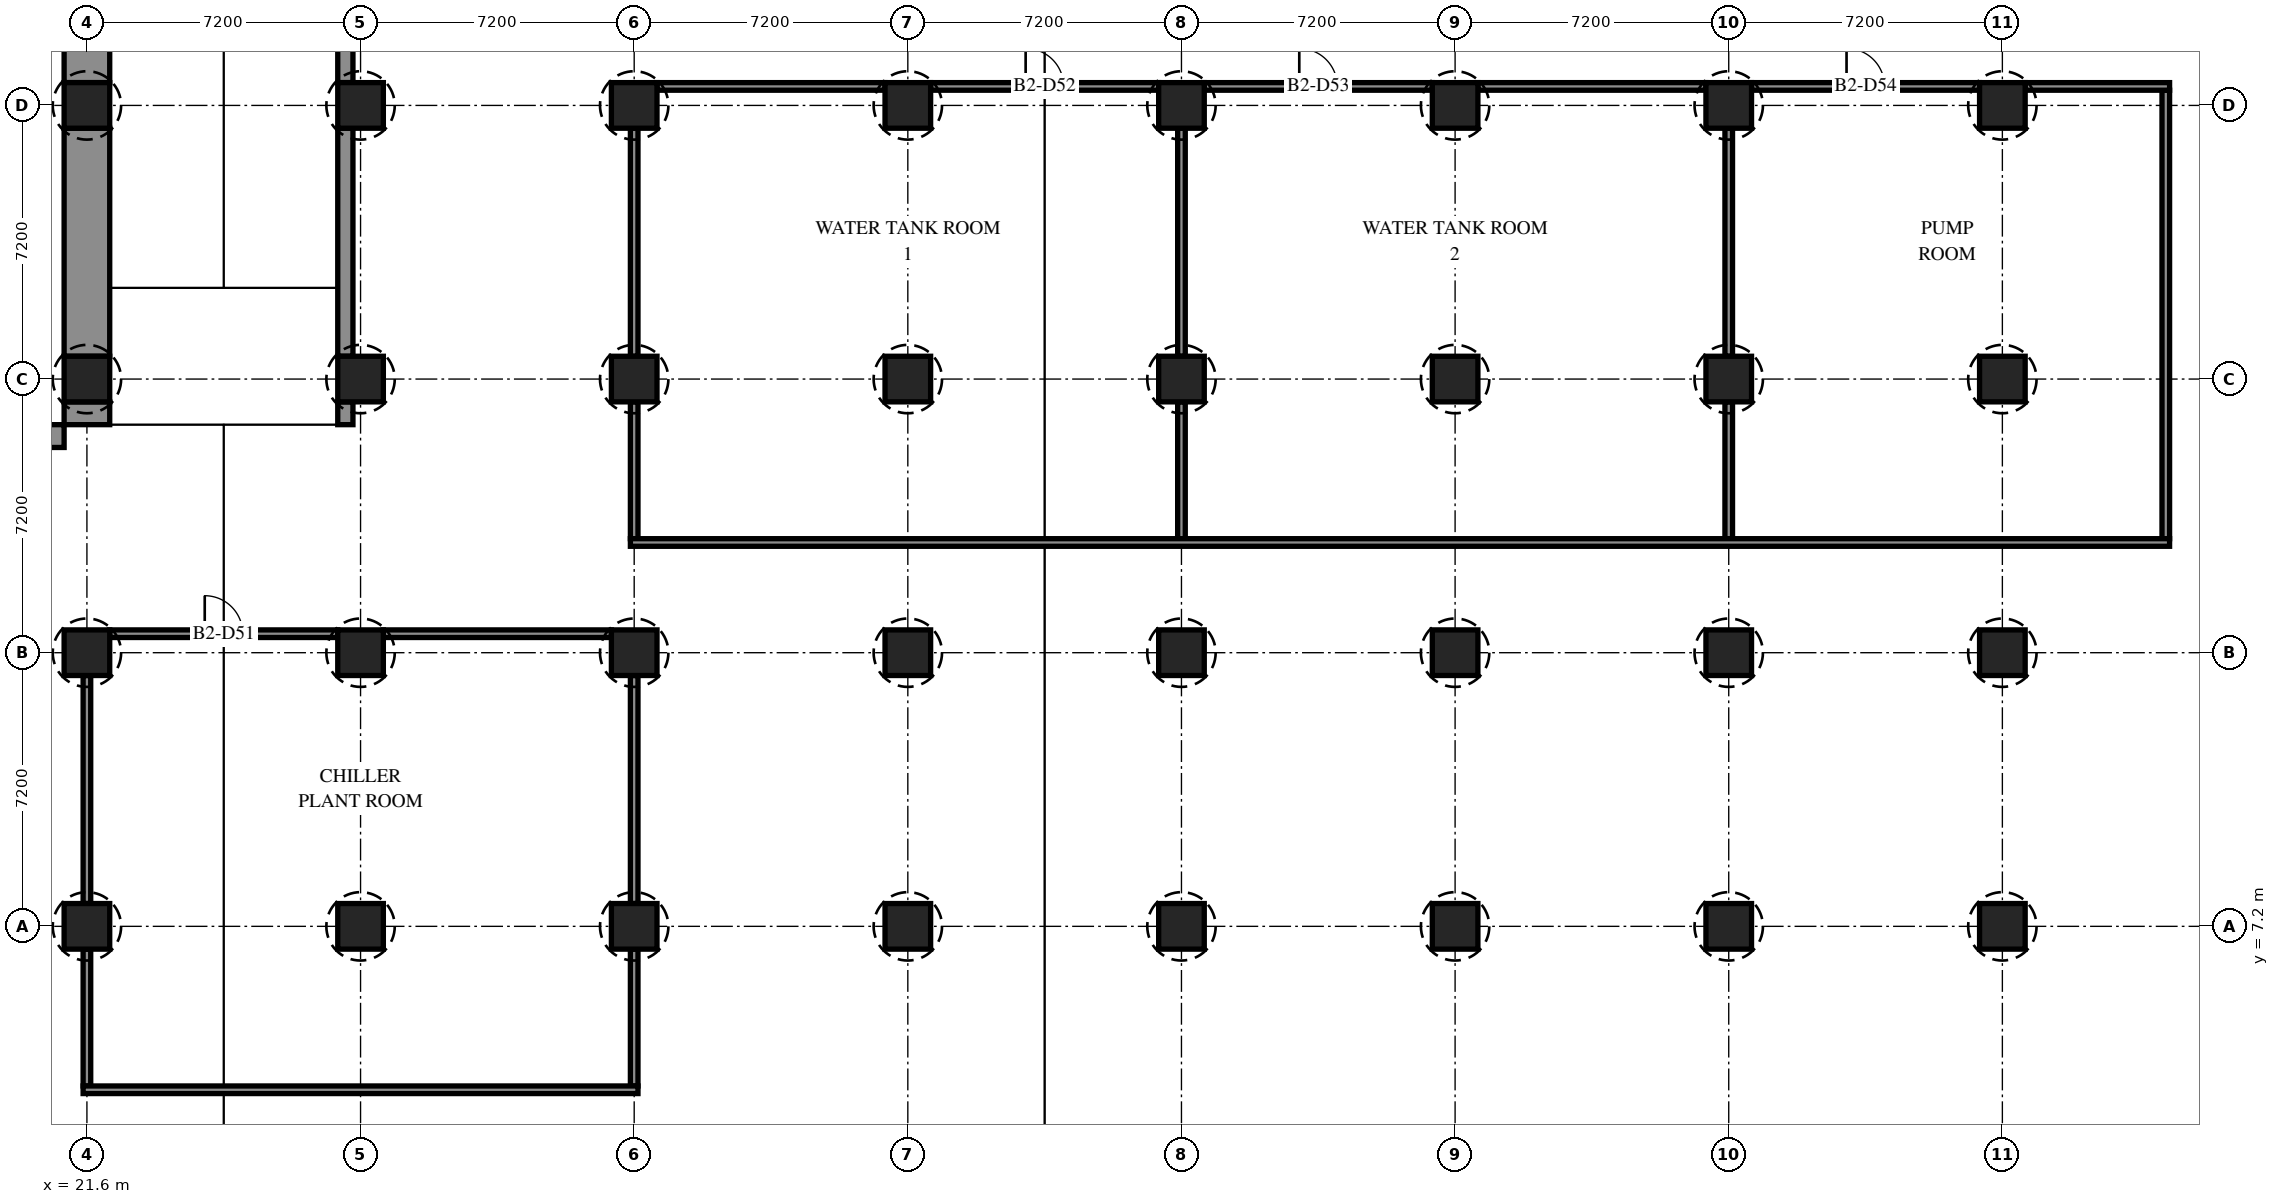
"""IFC4 building model, lengths in metres.
Left out: names, types, materials, properties, quantities, classifications, styles, units other than length and angle.
Written with IfcOpenShell. Run it as: python <this file> out.ifc"""

import sys

from ifc_helpers import new_model, si_unit, direction, frame, frame_2d, origin, origin_2d, place, context, subcontext, project, spatial, rectangle, extrude, element, fill, save


model = new_model("IFC4")
c1 = context("Model", 3, precision=1e-05, world=origin(), true_north=direction((0.0, 1.0)))
c2 = subcontext(c1, "Body", "Model", "MODEL_VIEW")
j1 = project(units=[si_unit("LENGTHUNIT", "METRE"), si_unit("PLANEANGLEUNIT", "RADIAN")], contexts=[c1])
p1 = place(None, origin())
s1 = spatial("IfcSite", under=j1, at=p1, CompositionType="ELEMENT")
p2 = place(p1, origin())
s2 = spatial("IfcBuilding", under=s1, at=p2, CompositionType="ELEMENT")
p3 = place(p2, frame((0.0, 0.0, -9.0)))
s3 = spatial("IfcBuildingStorey", under=s2, at=p3, CompositionType="ELEMENT", Elevation=-9.0)
for number, where, z_axis, x_axis in (
    (1, (21.6, 7.2, 0.0), (0.0, 0.0, 1.0), (1.0, 0.0, 0.0)),
    (2, (21.6, 14.4, 0.0), (0.0, 0.0, 1.0), (1.0, 0.0, 0.0)),
    (3, (21.6, 21.6, 0.0), (0.0, 0.0, 1.0), (1.0, 0.0, 0.0)),
    (4, (21.6, 28.8, 0.0), (0.0, 0.0, 1.0), (1.0, 0.0, 0.0)),
    (5, (28.8, 7.2, 0.0), (0.0, 0.0, 1.0), (1.0, 0.0, 0.0)),
    (6, (28.8, 14.4, 0.0), (0.0, 0.0, 1.0), (1.0, 0.0, 0.0)),
    (7, (28.8, 21.6, 0.0), (0.0, 0.0, 1.0), (1.0, 0.0, 0.0)),
    (8, (28.8, 28.8, 0.0), (0.0, 0.0, 1.0), (1.0, 0.0, 0.0)),
    (9, (36.0, 7.2, 0.0), (0.0, 0.0, 1.0), (1.0, 0.0, 0.0)),
    (10, (36.0, 14.4, 0.0), (0.0, 0.0, 1.0), (1.0, 0.0, 0.0)),
    (11, (36.0, 21.6, 0.0), (0.0, 0.0, 1.0), (1.0, 0.0, 0.0)),
    (12, (36.0, 28.8, 0.0), (0.0, 0.0, 1.0), (1.0, 0.0, 0.0)),
    (13, (43.2, 7.2, 0.0), (0.0, 0.0, 1.0), (1.0, 0.0, 0.0)),
    (14, (43.2, 14.4, 0.0), (0.0, 0.0, 1.0), (1.0, 0.0, 0.0)),
    (15, (43.2, 21.6, 0.0), (0.0, 0.0, 1.0), (1.0, 0.0, 0.0)),
    (16, (43.2, 28.8, 0.0), (0.0, 0.0, 1.0), (1.0, 0.0, 0.0)),
    (17, (50.4, 7.2, 0.0), (0.0, 0.0, 1.0), (1.0, 0.0, 0.0)),
    (18, (50.4, 14.4, 0.0), (0.0, 0.0, 1.0), (1.0, 0.0, 0.0)),
    (19, (50.4, 21.6, 0.0), (0.0, 0.0, 1.0), (1.0, 0.0, 0.0)),
    (20, (50.4, 28.8, 0.0), (0.0, 0.0, 1.0), (1.0, 0.0, 0.0)),
    (21, (57.6, 7.2, 0.0), (0.0, 0.0, 1.0), (1.0, 0.0, 0.0)),
    (22, (57.6, 14.4, 0.0), (0.0, 0.0, 1.0), (1.0, 0.0, 0.0)),
    (23, (57.6, 21.6, 0.0), (0.0, 0.0, 1.0), (1.0, 0.0, 0.0)),
    (24, (57.6, 28.8, 0.0), (0.0, 0.0, 1.0), (1.0, 0.0, 0.0)),
    (25, (64.8, 7.2, 0.0), (0.0, 0.0, 1.0), (1.0, 0.0, 0.0)),
    (26, (64.8, 14.4, 0.0), (0.0, 0.0, 1.0), (1.0, 0.0, 0.0)),
    (27, (64.8, 21.6, 0.0), (0.0, 0.0, 1.0), (1.0, 0.0, 0.0)),
    (28, (64.8, 28.8, 0.0), (0.0, 0.0, 1.0), (1.0, 0.0, 0.0)),
    (29, (72.0, 7.2, 0.0), (0.0, 0.0, 1.0), (1.0, 0.0, 0.0)),
    (30, (72.0, 14.4, 0.0), (0.0, 0.0, 1.0), (1.0, 0.0, 0.0)),
    (31, (72.0, 21.6, 0.0), (0.0, 0.0, 1.0), (1.0, 0.0, 0.0)),
    (32, (72.0, 28.8, 0.0), (0.0, 0.0, 1.0), (1.0, 0.0, 0.0)),
):
    element("IfcColumn", number, at=place(p3, frame(where, z_axis=z_axis, x_axis=x_axis)), inside=s3, PredefinedType="COLUMN", context=c2, shape_type="SweptSolid", body=[
        extrude(rectangle(XDim=1.2, YDim=1.2, at=origin_2d()), origin(), (0.0, 0.0, 1.0), 4.2),
    ])
p4 = place(p3, frame((21.6, 20.4, 0.0), z_axis=(0.0, 0.0, 1.0), x_axis=(0.0, 1.0, 0.0)))
e33 = element("IfcWall", 33, at=p4, inside=s3, PredefinedType="SOLIDWALL", context=c2, shape_type="SweptSolid", body=[
    extrude(rectangle(XDim=0.6, YDim=1.2, at=frame_2d((0.3, 0.0))), origin(), (0.0, 0.0, 1.0), 4.2),
])
for number, where, z_axis, x_axis in (
    (34, (21.6, 22.2, 0.0), (0.0, 0.0, 1.0), (0.0, 1.0, 0.0)),
    (35, (21.6, 29.4, 0.0), (0.0, 0.0, 1.0), (0.0, 1.0, 0.0)),
):
    element("IfcWall", number, at=place(p3, frame(where, z_axis=z_axis, x_axis=x_axis)), inside=s3, PredefinedType="SOLIDWALL", context=c2, shape_type="SweptSolid", body=[
        extrude(rectangle(XDim=6.0, YDim=1.2, at=frame_2d((3.0, 0.0))), origin(), (0.0, 0.0, 1.0), 4.2),
    ])
p5 = place(p3, frame((28.4, 20.4, 0.0), z_axis=(0.0, 0.0, 1.0), x_axis=(0.0, 1.0, 0.0)))
e36 = element("IfcWall", 36, at=p5, inside=s3, PredefinedType="SOLIDWALL", context=c2, shape_type="SweptSolid", body=[
    extrude(rectangle(XDim=0.6, YDim=0.4, at=frame_2d((0.3, 0.0))), origin(), (0.0, 0.0, 1.0), 4.2),
])
for number, where, z_axis, x_axis in (
    (37, (28.4, 22.2, 0.0), (0.0, 0.0, 1.0), (0.0, 1.0, 0.0)),
    (38, (28.4, 29.4, 0.0), (0.0, 0.0, 1.0), (0.0, 1.0, 0.0)),
):
    element("IfcWall", number, at=place(p3, frame(where, z_axis=z_axis, x_axis=x_axis)), inside=s3, PredefinedType="SOLIDWALL", context=c2, shape_type="SweptSolid", body=[
        extrude(rectangle(XDim=6.0, YDim=0.4, at=frame_2d((3.0, 0.0))), origin(), (0.0, 0.0, 1.0), 4.2),
    ])
p6 = place(p3, frame((15.0, 20.1, 0.0), z_axis=(0.0, 0.0, 1.0), x_axis=(1.0, 0.0, 0.0)))
e39 = element("IfcWall", 39, at=p6, inside=s3, PredefinedType="SOLIDWALL", context=c2, shape_type="SweptSolid", body=[
    extrude(rectangle(XDim=6.0, YDim=0.6, at=frame_2d((3.0, 0.0))), origin(), (0.0, 0.0, 1.0), 4.2),
])
p7 = place(p3, frame((21.6, 3.0, 0.0), z_axis=(0.0, 0.0, 1.0), x_axis=(0.0, 1.0, 0.0)))
e40 = element("IfcWall", 40, at=p7, inside=s3, PredefinedType="PARTITIONING", context=c2, shape_type="SweptSolid", body=[
    extrude(rectangle(XDim=3.6, YDim=0.2, at=frame_2d((1.8, 0.0))), origin(), (0.0, 0.0, 1.0), 4.2),
])
p8 = place(p3, frame((21.6, 7.8, 0.0), z_axis=(0.0, 0.0, 1.0), x_axis=(0.0, 1.0, 0.0)))
e41 = element("IfcWall", 41, at=p8, inside=s3, PredefinedType="PARTITIONING", context=c2, shape_type="SweptSolid", body=[
    extrude(rectangle(XDim=6.0, YDim=0.2, at=frame_2d((3.0, 0.0))), origin(), (0.0, 0.0, 1.0), 4.2),
])
p9 = place(p3, frame((36.0, 3.0, 0.0), z_axis=(0.0, 0.0, 1.0), x_axis=(0.0, 1.0, 0.0)))
e42 = element("IfcWall", 42, at=p9, inside=s3, PredefinedType="PARTITIONING", context=c2, shape_type="SweptSolid", body=[
    extrude(rectangle(XDim=3.6, YDim=0.2, at=frame_2d((1.8, 0.0))), origin(), (0.0, 0.0, 1.0), 4.2),
])
p10 = place(p3, frame((36.0, 7.8, 0.0), z_axis=(0.0, 0.0, 1.0), x_axis=(0.0, 1.0, 0.0)))
e43 = element("IfcWall", 43, at=p10, inside=s3, PredefinedType="PARTITIONING", context=c2, shape_type="SweptSolid", body=[
    extrude(rectangle(XDim=6.0, YDim=0.2, at=frame_2d((3.0, 0.0))), origin(), (0.0, 0.0, 1.0), 4.2),
])
p11 = place(p3, frame((36.0, 17.4, 0.0), z_axis=(0.0, 0.0, 1.0), x_axis=(0.0, 1.0, 0.0)))
e44 = element("IfcWall", 44, at=p11, inside=s3, PredefinedType="PARTITIONING", context=c2, shape_type="SweptSolid", body=[
    extrude(rectangle(XDim=3.6, YDim=0.2, at=frame_2d((1.8, 0.0))), origin(), (0.0, 0.0, 1.0), 4.2),
])
p12 = place(p3, frame((36.0, 22.2, 0.0), z_axis=(0.0, 0.0, 1.0), x_axis=(0.0, 1.0, 0.0)))
e45 = element("IfcWall", 45, at=p12, inside=s3, PredefinedType="PARTITIONING", context=c2, shape_type="SweptSolid", body=[
    extrude(rectangle(XDim=6.0, YDim=0.2, at=frame_2d((3.0, 0.0))), origin(), (0.0, 0.0, 1.0), 4.2),
])
p13 = place(p3, frame((50.4, 17.4, 0.0), z_axis=(0.0, 0.0, 1.0), x_axis=(0.0, 1.0, 0.0)))
e46 = element("IfcWall", 46, at=p13, inside=s3, PredefinedType="PARTITIONING", context=c2, shape_type="SweptSolid", body=[
    extrude(rectangle(XDim=3.6, YDim=0.2, at=frame_2d((1.8, 0.0))), origin(), (0.0, 0.0, 1.0), 4.2),
])
p14 = place(p3, frame((50.4, 22.2, 0.0), z_axis=(0.0, 0.0, 1.0), x_axis=(0.0, 1.0, 0.0)))
e47 = element("IfcWall", 47, at=p14, inside=s3, PredefinedType="PARTITIONING", context=c2, shape_type="SweptSolid", body=[
    extrude(rectangle(XDim=6.0, YDim=0.2, at=frame_2d((3.0, 0.0))), origin(), (0.0, 0.0, 1.0), 4.2),
])
p15 = place(p3, frame((64.8, 17.4, 0.0), z_axis=(0.0, 0.0, 1.0), x_axis=(0.0, 1.0, 0.0)))
e48 = element("IfcWall", 48, at=p15, inside=s3, PredefinedType="PARTITIONING", context=c2, shape_type="SweptSolid", body=[
    extrude(rectangle(XDim=3.6, YDim=0.2, at=frame_2d((1.8, 0.0))), origin(), (0.0, 0.0, 1.0), 4.2),
])
p16 = place(p3, frame((64.8, 22.2, 0.0), z_axis=(0.0, 0.0, 1.0), x_axis=(0.0, 1.0, 0.0)))
e49 = element("IfcWall", 49, at=p16, inside=s3, PredefinedType="PARTITIONING", context=c2, shape_type="SweptSolid", body=[
    extrude(rectangle(XDim=6.0, YDim=0.2, at=frame_2d((3.0, 0.0))), origin(), (0.0, 0.0, 1.0), 4.2),
])
p17 = place(p3, frame((76.3, 17.4, 0.0), z_axis=(0.0, 0.0, 1.0), x_axis=(0.0, 1.0, 0.0)))
e50 = element("IfcWall", 50, at=p17, inside=s3, PredefinedType="PARTITIONING", context=c2, shape_type="SweptSolid", body=[
    extrude(rectangle(XDim=11.8, YDim=0.2, at=frame_2d((5.9, 0.0))), origin(), (0.0, 0.0, 1.0), 4.2),
])
p18 = place(p3, frame((21.5, 2.9, 0.0), z_axis=(0.0, 0.0, 1.0), x_axis=(1.0, 0.0, 0.0)))
e51 = element("IfcWall", 51, at=p18, inside=s3, PredefinedType="PARTITIONING", context=c2, shape_type="SweptSolid", body=[
    extrude(rectangle(XDim=14.6, YDim=0.2, at=frame_2d((7.3, 0.0))), origin(), (0.0, 0.0, 1.0), 4.2),
])
p19 = place(p3, frame((22.2, 14.9, 0.0), z_axis=(0.0, 0.0, 1.0), x_axis=(1.0, 0.0, 0.0)))
e52 = element("IfcWall", 52, at=p19, inside=s3, PredefinedType="PARTITIONING", context=c2, shape_type="SweptSolid", body=[
    extrude(rectangle(XDim=6.0, YDim=0.2, at=frame_2d((3.0, 0.0))), origin(), (0.0, 0.0, 1.0), 4.2),
])
p20 = place(p19, frame((2.5, 0.0, 0.0)))
e53 = element("IfcOpeningElement", 53, at=p20, cuts=e52, PredefinedType="OPENING", context=c2, shape_type="SweptSolid", body=[
    extrude(rectangle(XDim=1.0, YDim=2.1, at=frame_2d((0.5, 1.05))), frame((0.0, 0.11, 0.0), z_axis=(0.0, -1.0, 0.0), x_axis=(1.0, 0.0, 0.0)), (0.0, 0.0, 1.0), 0.22),
])
p21 = place(p3, frame((29.4, 14.9, 0.0), z_axis=(0.0, 0.0, 1.0), x_axis=(1.0, 0.0, 0.0)))
e54 = element("IfcWall", 54, at=p21, inside=s3, PredefinedType="PARTITIONING", context=c2, shape_type="SweptSolid", body=[
    extrude(rectangle(XDim=6.0, YDim=0.2, at=frame_2d((3.0, 0.0))), origin(), (0.0, 0.0, 1.0), 4.2),
])
p22 = place(p3, frame((35.9, 17.3, 0.0), z_axis=(0.0, 0.0, 1.0), x_axis=(1.0, 0.0, 0.0)))
e55 = element("IfcWall", 55, at=p22, inside=s3, PredefinedType="PARTITIONING", context=c2, shape_type="SweptSolid", body=[
    extrude(rectangle(XDim=40.5, YDim=0.2, at=frame_2d((20.25, 0.0))), origin(), (0.0, 0.0, 1.0), 4.2),
])
p23 = place(p3, frame((36.6, 29.3, 0.0), z_axis=(0.0, 0.0, 1.0), x_axis=(1.0, 0.0, 0.0)))
e56 = element("IfcWall", 56, at=p23, inside=s3, PredefinedType="PARTITIONING", context=c2, shape_type="SweptSolid", body=[
    extrude(rectangle(XDim=6.0, YDim=0.2, at=frame_2d((3.0, 0.0))), origin(), (0.0, 0.0, 1.0), 4.2),
])
p24 = place(p3, frame((43.8, 29.3, 0.0), z_axis=(0.0, 0.0, 1.0), x_axis=(1.0, 0.0, 0.0)))
e57 = element("IfcWall", 57, at=p24, inside=s3, PredefinedType="PARTITIONING", context=c2, shape_type="SweptSolid", body=[
    extrude(rectangle(XDim=6.0, YDim=0.2, at=frame_2d((3.0, 0.0))), origin(), (0.0, 0.0, 1.0), 4.2),
])
p25 = place(p24, frame((2.5, 0.0, 0.0)))
e58 = element("IfcOpeningElement", 58, at=p25, cuts=e57, PredefinedType="OPENING", context=c2, shape_type="SweptSolid", body=[
    extrude(rectangle(XDim=1.0, YDim=2.1, at=frame_2d((0.5, 1.05))), frame((0.0, 0.11, 0.0), z_axis=(0.0, -1.0, 0.0), x_axis=(1.0, 0.0, 0.0)), (0.0, 0.0, 1.0), 0.22),
])
p26 = place(p3, frame((51.0, 29.3, 0.0), z_axis=(0.0, 0.0, 1.0), x_axis=(1.0, 0.0, 0.0)))
e59 = element("IfcWall", 59, at=p26, inside=s3, PredefinedType="PARTITIONING", context=c2, shape_type="SweptSolid", body=[
    extrude(rectangle(XDim=6.0, YDim=0.2, at=frame_2d((3.0, 0.0))), origin(), (0.0, 0.0, 1.0), 4.2),
])
p27 = place(p26, frame((2.5, 0.0, 0.0)))
e60 = element("IfcOpeningElement", 60, at=p27, cuts=e59, PredefinedType="OPENING", context=c2, shape_type="SweptSolid", body=[
    extrude(rectangle(XDim=1.0, YDim=2.1, at=frame_2d((0.5, 1.05))), frame((0.0, 0.11, 0.0), z_axis=(0.0, -1.0, 0.0), x_axis=(1.0, 0.0, 0.0)), (0.0, 0.0, 1.0), 0.22),
])
p28 = place(p3, frame((58.2, 29.3, 0.0), z_axis=(0.0, 0.0, 1.0), x_axis=(1.0, 0.0, 0.0)))
e61 = element("IfcWall", 61, at=p28, inside=s3, PredefinedType="PARTITIONING", context=c2, shape_type="SweptSolid", body=[
    extrude(rectangle(XDim=6.0, YDim=0.2, at=frame_2d((3.0, 0.0))), origin(), (0.0, 0.0, 1.0), 4.2),
])
p29 = place(p3, frame((65.4, 29.3, 0.0), z_axis=(0.0, 0.0, 1.0), x_axis=(1.0, 0.0, 0.0)))
e62 = element("IfcWall", 62, at=p29, inside=s3, PredefinedType="PARTITIONING", context=c2, shape_type="SweptSolid", body=[
    extrude(rectangle(XDim=6.0, YDim=0.2, at=frame_2d((3.0, 0.0))), origin(), (0.0, 0.0, 1.0), 4.2),
])
p30 = place(p29, frame((2.5, 0.0, 0.0)))
e63 = element("IfcOpeningElement", 63, at=p30, cuts=e62, PredefinedType="OPENING", context=c2, shape_type="SweptSolid", body=[
    extrude(rectangle(XDim=1.0, YDim=2.1, at=frame_2d((0.5, 1.05))), frame((0.0, 0.11, 0.0), z_axis=(0.0, -1.0, 0.0), x_axis=(1.0, 0.0, 0.0)), (0.0, 0.0, 1.0), 0.22),
])
p31 = place(p3, frame((72.6, 29.3, 0.0), z_axis=(0.0, 0.0, 1.0), x_axis=(1.0, 0.0, 0.0)))
e64 = element("IfcWall", 64, at=p31, inside=s3, PredefinedType="PARTITIONING", context=c2, shape_type="SweptSolid", body=[
    extrude(rectangle(XDim=3.8, YDim=0.2, at=frame_2d((1.9, 0.0))), origin(), (0.0, 0.0, 1.0), 4.2),
])
p32 = place(p20, origin())
e65 = element("IfcDoor", 65, at=p32, inside=s3, OperationType="SINGLE_SWING_RIGHT", PredefinedType="DOOR", context=c2, shape_type="SweptSolid", body=[
    extrude(rectangle(XDim=1.0, YDim=2.1, at=frame_2d((0.5, 1.05))), frame((0.0, 0.025, 0.0), z_axis=(0.0, -1.0, 0.0), x_axis=(1.0, 0.0, 0.0)), (0.0, 0.0, 1.0), 0.05),
])
fill(e53, e65)
p33 = place(p25, origin())
e66 = element("IfcDoor", 66, at=p33, inside=s3, OperationType="SINGLE_SWING_LEFT", PredefinedType="DOOR", context=c2, shape_type="SweptSolid", body=[
    extrude(rectangle(XDim=1.0, YDim=2.1, at=frame_2d((0.5, 1.05))), frame((0.0, 0.025, 0.0), z_axis=(0.0, -1.0, 0.0), x_axis=(1.0, 0.0, 0.0)), (0.0, 0.0, 1.0), 0.05),
])
fill(e58, e66)
p34 = place(p27, origin())
e67 = element("IfcDoor", 67, at=p34, inside=s3, OperationType="SINGLE_SWING_RIGHT", PredefinedType="DOOR", context=c2, shape_type="SweptSolid", body=[
    extrude(rectangle(XDim=1.0, YDim=2.1, at=frame_2d((0.5, 1.05))), frame((0.0, 0.025, 0.0), z_axis=(0.0, -1.0, 0.0), x_axis=(1.0, 0.0, 0.0)), (0.0, 0.0, 1.0), 0.05),
])
fill(e60, e67)
p35 = place(p30, origin())
e68 = element("IfcDoor", 68, at=p35, inside=s3, OperationType="SINGLE_SWING_LEFT", PredefinedType="DOOR", context=c2, shape_type="SweptSolid", body=[
    extrude(rectangle(XDim=1.0, YDim=2.1, at=frame_2d((0.5, 1.05))), frame((0.0, 0.025, 0.0), z_axis=(0.0, -1.0, 0.0), x_axis=(1.0, 0.0, 0.0)), (0.0, 0.0, 1.0), 0.05),
])
fill(e63, e68)
save(model, sys.argv[1])
